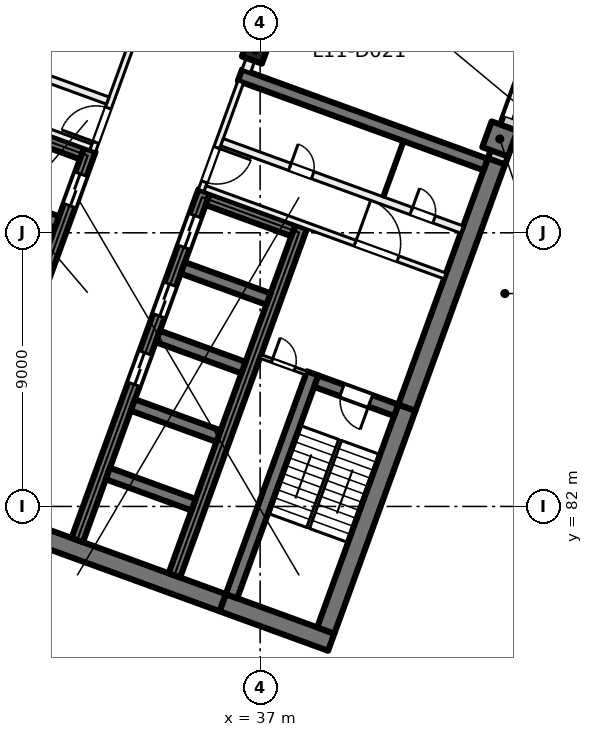
"""IFC4 building model, lengths in metres.
Left out: names, types, materials, properties, quantities, classifications, styles, units other than length and angle.
Written with IfcOpenShell. Run it as: python <this file> out.ifc"""

import sys

from ifc_helpers import new_model, si_unit, direction, frame, frame_2d, origin, origin_2d, place, context, subcontext, project, spatial, rectangle, extrude, element, fill, save


model = new_model("IFC4")
c1 = context("Model", 3, precision=1e-05, world=origin(), true_north=direction((0.0, 1.0)))
c2 = subcontext(c1, "Body", "Model", "MODEL_VIEW")
j1 = project(units=[si_unit("LENGTHUNIT", "METRE"), si_unit("PLANEANGLEUNIT", "RADIAN")], contexts=[c1])
p1 = place(None, origin())
s1 = spatial("IfcSite", under=j1, at=p1, CompositionType="ELEMENT")
p2 = place(p1, origin())
s2 = spatial("IfcBuilding", under=s1, at=p2, CompositionType="ELEMENT")
p3 = place(p2, frame((0.0, 0.0, 51.5)))
s3 = spatial("IfcBuildingStorey", under=s2, at=p3, CompositionType="ELEMENT", Elevation=51.5)
p4 = place(p3, frame((36.849, 97.011, 0.0), z_axis=(0.0, 0.0, 1.0), x_axis=(-0.342020143326, -0.939692620786, 0.0)))
e1 = element("IfcColumn", 1, at=p4, inside=s3, PredefinedType="COLUMN", context=c2, shape_type="SweptSolid", body=[
    extrude(rectangle(XDim=0.7, YDim=0.7, at=origin_2d()), origin(), (0.0, 0.0, 1.0), 4.0),
])
p5 = place(p3, frame((44.884, 94.087, 0.0), z_axis=(0.0, 0.0, 1.0), x_axis=(-0.342020143326, -0.939692620786, 0.0)))
e2 = element("IfcColumn", 2, at=p5, inside=s3, PredefinedType="COLUMN", context=c2, shape_type="SweptSolid", body=[
    extrude(rectangle(XDim=0.9, YDim=0.9, at=origin_2d()), origin(), (0.0, 0.0, 1.0), 4.0),
])
p6 = place(p3, frame((39.338, 77.535, 0.0), z_axis=(0.0, 0.0, 1.0), x_axis=(-0.939701471648, 0.341995824804, 0.0)))
e3 = element("IfcWall", 3, at=p6, inside=s3, PredefinedType="SHEAR", context=c2, shape_type="SweptSolid", body=[
    extrude(rectangle(XDim=3.8, YDim=0.6, at=frame_2d((1.9, 0.0))), origin(), (0.0, 0.0, 1.0), 4.0),
])
p7 = place(p3, frame((35.767, 78.835, 0.0), z_axis=(0.0, 0.0, 1.0), x_axis=(-0.939692894512, 0.342019391267, 0.0)))
e4 = element("IfcWall", 4, at=p7, inside=s3, PredefinedType="SHEAR", context=c2, shape_type="SweptSolid", body=[
    extrude(rectangle(XDim=14.4, YDim=0.6, at=frame_2d((7.2, 0.0))), origin(), (0.0, 0.0, 1.0), 4.0),
])
p8 = place(p3, frame((39.159, 77.92, 0.0), z_axis=(0.0, 0.0, 1.0), x_axis=(0.342016982193, 0.939693771338, 0.0)))
e5 = element("IfcWall", 5, at=p8, inside=s3, PredefinedType="SHEAR", context=c2, shape_type="SweptSolid", body=[
    extrude(rectangle(XDim=7.8, YDim=0.6, at=frame_2d((3.9, 0.0))), origin(), (0.0, 0.0, 1.0), 4.0),
])
p9 = place(p3, frame((41.827, 85.249, 0.0), z_axis=(0.0, 0.0, 1.0), x_axis=(0.342016162452, 0.939694069696, 0.0)))
e6 = element("IfcWall", 6, at=p9, inside=s3, PredefinedType="SHEAR", context=c2, shape_type="SweptSolid", body=[
    extrude(rectangle(XDim=8.9, YDim=0.6, at=frame_2d((4.45, 0.0))), origin(), (0.0, 0.0, 1.0), 4.0),
])
p10 = place(p3, frame((36.058, 79.048, 0.0), z_axis=(0.0, 0.0, 1.0), x_axis=(0.342016982193, 0.939693771338, 0.0)))
e7 = element("IfcWall", 7, at=p10, inside=s3, PredefinedType="SHEAR", context=c2, shape_type="SweptSolid", body=[
    extrude(rectangle(XDim=7.8, YDim=0.4, at=frame_2d((3.9, 0.0))), origin(), (0.0, 0.0, 1.0), 4.0),
])
p11 = place(p3, frame((41.476, 85.164, 0.0), z_axis=(0.0, 0.0, 1.0), x_axis=(-0.939678810556, 0.342058084236, 0.0)))
e8 = element("IfcWall", 8, at=p11, inside=s3, PredefinedType="SHEAR", context=c2, shape_type="SweptSolid", body=[
    extrude(rectangle(XDim=2.8, YDim=0.4, at=frame_2d((1.4, 0.0))), origin(), (0.0, 0.0, 1.0), 4.0),
])
p12 = place(p11, frame((0.9, 0.0, 0.0)))
e9 = element("IfcOpeningElement", 9, at=p12, cuts=e8, PredefinedType="OPENING", context=c2, shape_type="SweptSolid", body=[
    extrude(rectangle(XDim=1.0, YDim=2.1, at=frame_2d((0.5, 1.05))), frame((0.0, 0.21, 0.0), z_axis=(0.0, -1.0, 0.0), x_axis=(1.0, 0.0, 0.0)), (0.0, 0.0, 1.0), 0.42),
])
p13 = place(p3, frame((30.984, 80.895, 0.0), z_axis=(0.0, 0.0, 1.0), x_axis=(0.342021021735, 0.939692301071, 0.0)))
e10 = element("IfcWall", 10, at=p13, inside=s3, PredefinedType="SHEAR", context=c2, shape_type="SweptSolid", body=[
    extrude(rectangle(XDim=12.2, YDim=0.4, at=frame_2d((6.1, 0.0))), origin(), (0.0, 0.0, 1.0), 4.0),
])
p14 = place(p13, frame((5.45, 0.0, 0.0)))
e11 = element("IfcOpeningElement", 11, at=p14, cuts=e10, PredefinedType="OPENING", context=c2, shape_type="SweptSolid", body=[
    extrude(rectangle(XDim=1.1, YDim=2.1, at=frame_2d((0.55, 1.05))), frame((0.0, 0.21, 0.0), z_axis=(0.0, -1.0, 0.0), x_axis=(1.0, 0.0, 0.0)), (0.0, 0.0, 1.0), 0.42),
])
p15 = place(p13, frame((7.85, 0.0, 0.0)))
e12 = element("IfcOpeningElement", 12, at=p15, cuts=e10, PredefinedType="OPENING", context=c2, shape_type="SweptSolid", body=[
    extrude(rectangle(XDim=1.1, YDim=2.1, at=frame_2d((0.55, 1.05))), frame((0.0, 0.21, 0.0), z_axis=(0.0, -1.0, 0.0), x_axis=(1.0, 0.0, 0.0)), (0.0, 0.0, 1.0), 0.42),
])
p16 = place(p13, frame((10.25, 0.0, 0.0)))
e13 = element("IfcOpeningElement", 13, at=p16, cuts=e10, PredefinedType="OPENING", context=c2, shape_type="SweptSolid", body=[
    extrude(rectangle(XDim=1.1, YDim=2.1, at=frame_2d((0.55, 1.05))), frame((0.0, 0.21, 0.0), z_axis=(0.0, -1.0, 0.0), x_axis=(1.0, 0.0, 0.0)), (0.0, 0.0, 1.0), 0.42),
])
p17 = place(p3, frame((34.178, 79.732, 0.0), z_axis=(0.0, 0.0, 1.0), x_axis=(0.342014590177, 0.939694641948, 0.0)))
e14 = element("IfcWall", 14, at=p17, inside=s3, PredefinedType="SHEAR", context=c2, shape_type="SweptSolid", body=[
    extrude(rectangle(XDim=12.2, YDim=0.4, at=frame_2d((6.1, 0.0))), origin(), (0.0, 0.0, 1.0), 4.0),
])
for number, where, z_axis, x_axis in (
    (15, (34.812, 82.056, 0.0), (0.0, 0.0, 1.0), (-0.94, 0.342, 0.0)),
    (16, (35.632, 84.311, 0.0), (0.0, 0.0, 1.0), (-0.94, 0.342, 0.0)),
    (17, (36.453, 86.566, 0.0), (0.0, 0.0, 1.0), (-0.94, 0.342, 0.0)),
    (18, (37.274, 88.822, 0.0), (0.0, 0.0, 1.0), (-0.94, 0.342, 0.0)),
):
    element("IfcWall", number, at=place(p3, frame(where, z_axis=z_axis, x_axis=x_axis)), inside=s3, PredefinedType="SHEAR", context=c2, shape_type="SweptSolid", body=[
        extrude(rectangle(XDim=3.0, YDim=0.4, at=frame_2d((1.5, 0.0))), origin(), (0.0, 0.0, 1.0), 4.0),
    ])
p18 = place(p3, frame((38.095, 91.077, 0.0), z_axis=(0.0, 0.0, 1.0), x_axis=(-0.939676934218, 0.342063238742, 0.0)))
e19 = element("IfcWall", 19, at=p18, inside=s3, PredefinedType="SHEAR", context=c2, shape_type="SweptSolid", body=[
    extrude(rectangle(XDim=3.0, YDim=0.4, at=frame_2d((1.5, 0.0))), origin(), (0.0, 0.0, 1.0), 4.0),
])
p19 = place(p3, frame((27.225, 82.263, 0.0), z_axis=(0.0, 0.0, 1.0), x_axis=(0.342014590177, 0.939694641948, 0.0)))
e20 = element("IfcWall", 20, at=p19, inside=s3, PredefinedType="SHEAR", context=c2, shape_type="SweptSolid", body=[
    extrude(rectangle(XDim=12.2, YDim=0.4, at=frame_2d((6.1, 0.0))), origin(), (0.0, 0.0, 1.0), 4.0),
])
p20 = place(p19, frame((10.25, 0.0, 0.0)))
e21 = element("IfcOpeningElement", 21, at=p20, cuts=e20, PredefinedType="OPENING", context=c2, shape_type="SweptSolid", body=[
    extrude(rectangle(XDim=1.1, YDim=2.1, at=frame_2d((0.55, 1.05))), frame((0.0, 0.21, 0.0), z_axis=(0.0, -1.0, 0.0), x_axis=(1.0, 0.0, 0.0)), (0.0, 0.0, 1.0), 0.42),
])
p21 = place(p19, frame((0.6, 0.0, 0.0)))
e22 = element("IfcOpeningElement", 22, at=p21, cuts=e20, PredefinedType="OPENING", context=c2, shape_type="SweptSolid", body=[
    extrude(rectangle(XDim=1.0, YDim=2.1, at=frame_2d((0.5, 1.05))), frame((0.0, 0.21, 0.0), z_axis=(0.0, -1.0, 0.0), x_axis=(1.0, 0.0, 0.0)), (0.0, 0.0, 1.0), 0.42),
])
for number, where, z_axis, x_axis in (
    (23, (30.32, 91.353, 0.0), (0.0, 0.0, 1.0), (-0.94, 0.342, 0.0)),
    (24, (31.141, 93.608, 0.0), (0.0, 0.0, 1.0), (-0.94, 0.342, 0.0)),
):
    element("IfcWall", number, at=place(p3, frame(where, z_axis=z_axis, x_axis=x_axis)), inside=s3, PredefinedType="SHEAR", context=c2, shape_type="SweptSolid", body=[
        extrude(rectangle(XDim=3.0, YDim=0.4, at=frame_2d((1.5, 0.0))), origin(), (0.0, 0.0, 1.0), 4.0),
    ])
p22 = place(p3, frame((44.418, 93.245, 0.0), z_axis=(0.0, 0.0, 1.0), x_axis=(-0.93969060187, 0.342025690201, 0.0)))
e25 = element("IfcWall", 25, at=p22, inside=s3, PredefinedType="SHEAR", context=c2, shape_type="SweptSolid", body=[
    extrude(rectangle(XDim=8.6, YDim=0.4, at=frame_2d((4.3, 0.0))), origin(), (0.0, 0.0, 1.0), 4.0),
])
p23 = place(p3, frame((52.212, 113.783, 0.0), z_axis=(0.0, 0.0, 1.0), x_axis=(-0.34202521188, -0.939690775968, 0.0)))
e26 = element("IfcWall", 26, at=p23, inside=s3, PredefinedType="SOLIDWALL", context=c2, shape_type="SweptSolid", body=[
    extrude(rectangle(XDim=21.745, YDim=0.6, at=frame_2d((10.873, 0.0))), origin(), (0.0, 0.0, 1.0), 3.625),
])
p24 = place(p23, frame((3.765, 0.0, 0.9)))
e27 = element("IfcOpeningElement", 27, at=p24, cuts=e26, PredefinedType="OPENING", context=c2, shape_type="SweptSolid", body=[
    extrude(rectangle(XDim=3.0, YDim=2.4, at=frame_2d((1.5, 1.2))), frame((0.0, 0.31, 0.0), z_axis=(0.0, -1.0, 0.0), x_axis=(1.0, 0.0, 0.0)), (0.0, 0.0, 1.0), 0.62),
])
p25 = place(p23, frame((8.265, 0.0, 0.9)))
e28 = element("IfcOpeningElement", 28, at=p25, cuts=e26, PredefinedType="OPENING", context=c2, shape_type="SweptSolid", body=[
    extrude(rectangle(XDim=3.0, YDim=2.4, at=frame_2d((1.5, 1.2))), frame((0.0, 0.31, 0.0), z_axis=(0.0, -1.0, 0.0), x_axis=(1.0, 0.0, 0.0)), (0.0, 0.0, 1.0), 0.62),
])
p26 = place(p23, frame((12.765, 0.0, 0.9)))
e29 = element("IfcOpeningElement", 29, at=p26, cuts=e26, PredefinedType="OPENING", context=c2, shape_type="SweptSolid", body=[
    extrude(rectangle(XDim=3.0, YDim=2.4, at=frame_2d((1.5, 1.2))), frame((0.0, 0.31, 0.0), z_axis=(0.0, -1.0, 0.0), x_axis=(1.0, 0.0, 0.0)), (0.0, 0.0, 1.0), 0.62),
])
p27 = place(p23, frame((17.265, 0.0, 0.9)))
e30 = element("IfcOpeningElement", 30, at=p27, cuts=e26, PredefinedType="OPENING", context=c2, shape_type="SweptSolid", body=[
    extrude(rectangle(XDim=3.0, YDim=2.4, at=frame_2d((1.5, 1.2))), frame((0.0, 0.31, 0.0), z_axis=(0.0, -1.0, 0.0), x_axis=(1.0, 0.0, 0.0)), (0.0, 0.0, 1.0), 0.62),
])
p28 = place(p3, frame((31.491, 93.693, 0.0), z_axis=(0.0, 0.0, 1.0), x_axis=(0.341995824804, 0.939701471648, 0.0)))
e31 = element("IfcWall", 31, at=p28, inside=s3, PredefinedType="PARTITIONING", context=c2, shape_type="SweptSolid", body=[
    extrude(rectangle(XDim=3.8, YDim=0.2, at=frame_2d((1.9, 0.0))), origin(), (0.0, 0.0, 1.0), 3.625),
])
p29 = place(p28, frame((0.3, 0.0, 0.0)))
e32 = element("IfcOpeningElement", 32, at=p29, cuts=e31, PredefinedType="OPENING", context=c2, shape_type="SweptSolid", body=[
    extrude(rectangle(XDim=1.2, YDim=2.1, at=frame_2d((0.6, 1.05))), frame((0.0, 0.11, 0.0), z_axis=(0.0, -1.0, 0.0), x_axis=(1.0, 0.0, 0.0)), (0.0, 0.0, 1.0), 0.22),
])
p30 = place(p3, frame((23.538, 96.694, 0.0), z_axis=(0.0, 0.0, 1.0), x_axis=(0.939691552312, -0.342023078919, 0.0)))
e33 = element("IfcWall", 33, at=p30, inside=s3, PredefinedType="PARTITIONING", context=c2, shape_type="SweptSolid", body=[
    extrude(rectangle(XDim=8.4, YDim=0.2, at=frame_2d((4.2, 0.0))), origin(), (0.0, 0.0, 1.0), 3.625),
])
p31 = place(p30, frame((1.65, 0.0, 0.0)))
e34 = element("IfcOpeningElement", 34, at=p31, cuts=e33, PredefinedType="OPENING", context=c2, shape_type="SweptSolid", body=[
    extrude(rectangle(XDim=1.5, YDim=2.1, at=frame_2d((0.75, 1.05))), frame((0.0, 0.11, 0.0), z_axis=(0.0, -1.0, 0.0), x_axis=(1.0, 0.0, 0.0)), (0.0, 0.0, 1.0), 0.22),
])
p32 = place(p3, frame((24.094, 98.221, 0.0), z_axis=(0.0, 0.0, 1.0), x_axis=(0.939691552312, -0.342023078919, 0.0)))
e35 = element("IfcWall", 35, at=p32, inside=s3, PredefinedType="PARTITIONING", context=c2, shape_type="SweptSolid", body=[
    extrude(rectangle(XDim=8.4, YDim=0.25, at=frame_2d((4.2, 0.0))), origin(), (0.0, 0.0, 1.0), 3.625),
])
p33 = place(p32, frame((5.225, 0.0, 0.0)))
e36 = element("IfcOpeningElement", 36, at=p33, cuts=e35, PredefinedType="OPENING", context=c2, shape_type="SweptSolid", body=[
    extrude(rectangle(XDim=0.8, YDim=2.1, at=frame_2d((0.4, 1.05))), frame((0.0, 0.135, 0.0), z_axis=(0.0, -1.0, 0.0), x_axis=(1.0, 0.0, 0.0)), (0.0, 0.0, 1.0), 0.27),
])
p34 = place(p32, frame((0.975, 0.0, 0.0)))
e37 = element("IfcOpeningElement", 37, at=p34, cuts=e35, PredefinedType="OPENING", context=c2, shape_type="SweptSolid", body=[
    extrude(rectangle(XDim=0.8, YDim=2.1, at=frame_2d((0.4, 1.05))), frame((0.0, 0.135, 0.0), z_axis=(0.0, -1.0, 0.0), x_axis=(1.0, 0.0, 0.0)), (0.0, 0.0, 1.0), 0.27),
])
p35 = place(p3, frame((36.362, 95.964, 0.0), z_axis=(0.0, 0.0, 1.0), x_axis=(-0.341995824804, -0.939701471648, 0.0)))
e38 = element("IfcWall", 38, at=p35, inside=s3, PredefinedType="PARTITIONING", context=c2, shape_type="SweptSolid", body=[
    extrude(rectangle(XDim=3.8, YDim=0.2, at=frame_2d((1.9, 0.0))), origin(), (0.0, 0.0, 1.0), 3.625),
])
p36 = place(p35, frame((2.3, 0.0, 0.0)))
e39 = element("IfcOpeningElement", 39, at=p36, cuts=e38, PredefinedType="OPENING", context=c2, shape_type="SweptSolid", body=[
    extrude(rectangle(XDim=1.2, YDim=2.1, at=frame_2d((0.6, 1.05))), frame((0.0, 0.11, 0.0), z_axis=(0.0, -1.0, 0.0), x_axis=(1.0, 0.0, 0.0)), (0.0, 0.0, 1.0), 0.22),
])
p37 = place(p3, frame((35.19, 92.453, 0.0), z_axis=(0.0, 0.0, 1.0), x_axis=(0.939691552312, -0.342023078919, 0.0)))
e40 = element("IfcWall", 40, at=p37, inside=s3, PredefinedType="PARTITIONING", context=c2, shape_type="SweptSolid", body=[
    extrude(rectangle(XDim=8.4, YDim=0.2, at=frame_2d((4.2, 0.0))), origin(), (0.0, 0.0, 1.0), 3.625),
])
p38 = place(p37, frame((5.25, 0.0, 0.0)))
e41 = element("IfcOpeningElement", 41, at=p38, cuts=e40, PredefinedType="OPENING", context=c2, shape_type="SweptSolid", body=[
    extrude(rectangle(XDim=1.5, YDim=2.1, at=frame_2d((0.75, 1.05))), frame((0.0, 0.11, 0.0), z_axis=(0.0, -1.0, 0.0), x_axis=(1.0, 0.0, 0.0)), (0.0, 0.0, 1.0), 0.22),
])
p39 = place(p3, frame((35.746, 93.98, 0.0), z_axis=(0.0, 0.0, 1.0), x_axis=(0.939691552312, -0.342023078919, 0.0)))
e42 = element("IfcWall", 42, at=p39, inside=s3, PredefinedType="PARTITIONING", context=c2, shape_type="SweptSolid", body=[
    extrude(rectangle(XDim=8.4, YDim=0.25, at=frame_2d((4.2, 0.0))), origin(), (0.0, 0.0, 1.0), 3.625),
])
p40 = place(p39, frame((2.375, 0.0, 0.0)))
e43 = element("IfcOpeningElement", 43, at=p40, cuts=e42, PredefinedType="OPENING", context=c2, shape_type="SweptSolid", body=[
    extrude(rectangle(XDim=0.8, YDim=2.1, at=frame_2d((0.4, 1.05))), frame((0.0, 0.135, 0.0), z_axis=(0.0, -1.0, 0.0), x_axis=(1.0, 0.0, 0.0)), (0.0, 0.0, 1.0), 0.27),
])
p41 = place(p39, frame((6.625, 0.0, 0.0)))
e44 = element("IfcOpeningElement", 44, at=p41, cuts=e42, PredefinedType="OPENING", context=c2, shape_type="SweptSolid", body=[
    extrude(rectangle(XDim=0.8, YDim=2.1, at=frame_2d((0.4, 1.05))), frame((0.0, 0.135, 0.0), z_axis=(0.0, -1.0, 0.0), x_axis=(1.0, 0.0, 0.0)), (0.0, 0.0, 1.0), 0.27),
])
p42 = place(p3, frame((37.013, 86.935, 0.0), z_axis=(0.0, 0.0, 1.0), x_axis=(0.939659694648, -0.342110593602, 0.0)))
e45 = element("IfcWall", 45, at=p42, inside=s3, PredefinedType="PARTITIONING", context=c2, shape_type="SweptSolid", body=[
    extrude(rectangle(XDim=1.6, YDim=0.125, at=frame_2d((0.8, 0.0))), origin(), (0.0, 0.0, 1.0), 3.625),
])
p43 = place(p42, frame((0.4, 0.0, 0.0)))
e46 = element("IfcOpeningElement", 46, at=p43, cuts=e45, PredefinedType="OPENING", context=c2, shape_type="SweptSolid", body=[
    extrude(rectangle(XDim=0.8, YDim=2.1, at=frame_2d((0.4, 1.05))), frame((0.0, 0.073, 0.0), z_axis=(0.0, -1.0, 0.0), x_axis=(1.0, 0.0, 0.0)), (0.0, 0.0, 1.0), 0.145),
])
p44 = place(p3, frame((41.718, 94.015, 0.0), z_axis=(0.0, 0.0, 1.0), x_axis=(-0.342064742067, -0.939676386973, 0.0)))
e47 = element("IfcWall", 47, at=p44, inside=s3, PredefinedType="PARTITIONING", context=c2, shape_type="SweptSolid", body=[
    extrude(rectangle(XDim=1.95, YDim=0.1, at=frame_2d((0.975, 0.0))), origin(), (0.0, 0.0, 1.0), 3.625),
])
p45 = place(p3, frame((44.612, 118.483, 0.0), z_axis=(0.0, 0.0, 1.0), x_axis=(-0.342043123066, -0.939684256526, 0.0)))
e48 = element("IfcWall", 48, at=p45, inside=s3, PredefinedType="PARTITIONING", context=c2, shape_type="SweptSolid", body=[
    extrude(rectangle(XDim=23.582, YDim=0.3, at=frame_2d((11.791, 0.0))), origin(), (0.0, 0.0, 1.0), 3.625),
])
p46 = place(p45, frame((14.932, 0.0, 0.0)))
e49 = element("IfcOpeningElement", 49, at=p46, cuts=e48, PredefinedType="OPENING", context=c2, shape_type="SweptSolid", body=[
    extrude(rectangle(XDim=0.8, YDim=2.1, at=frame_2d((0.4, 1.05))), frame((0.0, 0.16, 0.0), z_axis=(0.0, -1.0, 0.0), x_axis=(1.0, 0.0, 0.0)), (0.0, 0.0, 1.0), 0.32),
])
p47 = place(p45, frame((10.982, 0.0, 0.0)))
e50 = element("IfcOpeningElement", 50, at=p47, cuts=e48, PredefinedType="OPENING", context=c2, shape_type="SweptSolid", body=[
    extrude(rectangle(XDim=1.2, YDim=2.1, at=frame_2d((0.6, 1.05))), frame((0.0, 0.16, 0.0), z_axis=(0.0, -1.0, 0.0), x_axis=(1.0, 0.0, 0.0)), (0.0, 0.0, 1.0), 0.32),
])
p48 = place(p45, frame((19.307, 0.0, 0.0)))
e51 = element("IfcOpeningElement", 51, at=p48, cuts=e48, PredefinedType="OPENING", context=c2, shape_type="SweptSolid", body=[
    extrude(rectangle(XDim=1.8, YDim=2.1, at=frame_2d((0.9, 1.05))), frame((0.0, 0.16, 0.0), z_axis=(0.0, -1.0, 0.0), x_axis=(1.0, 0.0, 0.0)), (0.0, 0.0, 1.0), 0.32),
])
p49 = place(p45, frame((5.756, 0.0, 0.0)))
e52 = element("IfcOpeningElement", 52, at=p49, cuts=e48, PredefinedType="OPENING", context=c2, shape_type="SweptSolid", body=[
    extrude(rectangle(XDim=1.8, YDim=2.1, at=frame_2d((0.9, 1.05))), frame((0.0, 0.16, 0.0), z_axis=(0.0, -1.0, 0.0), x_axis=(1.0, 0.0, 0.0)), (0.0, 0.0, 1.0), 0.32),
])
p50 = place(p27, origin())
e53 = element("IfcWindow", 53, at=p50, inside=s3, PartitioningType="SINGLE_PANEL", PredefinedType="WINDOW", context=c2, shape_type="SweptSolid", body=[
    extrude(rectangle(XDim=3.0, YDim=2.4, at=frame_2d((1.5, 1.2))), frame((0.0, 0.03, 0.0), z_axis=(0.0, -1.0, 0.0), x_axis=(1.0, 0.0, 0.0)), (0.0, 0.0, 1.0), 0.06),
])
fill(e30, e53)
p51 = place(p20, origin())
e54 = element("IfcDoor", 54, at=p51, inside=s3, OperationType="DOUBLE_DOOR_SLIDING", PredefinedType="DOOR", context=c2, shape_type="SweptSolid", body=[
    extrude(rectangle(XDim=1.1, YDim=2.1, at=frame_2d((0.55, 1.05))), frame((0.0, 0.025, 0.0), z_axis=(0.0, -1.0, 0.0), x_axis=(1.0, 0.0, 0.0)), (0.0, 0.0, 1.0), 0.05),
])
fill(e21, e54)
p52 = place(p14, origin())
e55 = element("IfcDoor", 55, at=p52, inside=s3, OperationType="DOUBLE_DOOR_SLIDING", PredefinedType="DOOR", context=c2, shape_type="SweptSolid", body=[
    extrude(rectangle(XDim=1.1, YDim=2.1, at=frame_2d((0.55, 1.05))), frame((0.0, 0.025, 0.0), z_axis=(0.0, -1.0, 0.0), x_axis=(1.0, 0.0, 0.0)), (0.0, 0.0, 1.0), 0.05),
])
fill(e11, e55)
p53 = place(p15, origin())
e56 = element("IfcDoor", 56, at=p53, inside=s3, OperationType="DOUBLE_DOOR_SLIDING", PredefinedType="DOOR", context=c2, shape_type="SweptSolid", body=[
    extrude(rectangle(XDim=1.1, YDim=2.1, at=frame_2d((0.55, 1.05))), frame((0.0, 0.025, 0.0), z_axis=(0.0, -1.0, 0.0), x_axis=(1.0, 0.0, 0.0)), (0.0, 0.0, 1.0), 0.05),
])
fill(e12, e56)
p54 = place(p16, origin())
e57 = element("IfcDoor", 57, at=p54, inside=s3, OperationType="DOUBLE_DOOR_SLIDING", PredefinedType="DOOR", context=c2, shape_type="SweptSolid", body=[
    extrude(rectangle(XDim=1.1, YDim=2.1, at=frame_2d((0.55, 1.05))), frame((0.0, 0.025, 0.0), z_axis=(0.0, -1.0, 0.0), x_axis=(1.0, 0.0, 0.0)), (0.0, 0.0, 1.0), 0.05),
])
fill(e13, e57)
p55 = place(p29, origin())
e58 = element("IfcDoor", 58, at=p55, inside=s3, OperationType="DOUBLE_DOOR_SINGLE_SWING", PredefinedType="DOOR", context=c2, shape_type="SweptSolid", body=[
    extrude(rectangle(XDim=1.2, YDim=2.1, at=frame_2d((0.6, 1.05))), frame((0.0, 0.025, 0.0), z_axis=(0.0, -1.0, 0.0), x_axis=(1.0, 0.0, 0.0)), (0.0, 0.0, 1.0), 0.05),
])
fill(e32, e58)
p56 = place(p36, origin())
e59 = element("IfcDoor", 59, at=p56, inside=s3, OperationType="DOUBLE_DOOR_SINGLE_SWING", PredefinedType="DOOR", context=c2, shape_type="SweptSolid", body=[
    extrude(rectangle(XDim=1.2, YDim=2.1, at=frame_2d((0.6, 1.05))), frame((0.0, 0.025, 0.0), z_axis=(0.0, -1.0, 0.0), x_axis=(1.0, 0.0, 0.0)), (0.0, 0.0, 1.0), 0.05),
])
fill(e39, e59)
p57 = place(p38, origin())
e60 = element("IfcDoor", 60, at=p57, inside=s3, OperationType="DOUBLE_DOOR_SINGLE_SWING", PredefinedType="DOOR", context=c2, shape_type="SweptSolid", body=[
    extrude(rectangle(XDim=1.5, YDim=2.1, at=frame_2d((0.75, 1.05))), frame((0.0, 0.025, 0.0), z_axis=(0.0, -1.0, 0.0), x_axis=(1.0, 0.0, 0.0)), (0.0, 0.0, 1.0), 0.05),
])
fill(e41, e60)
p58 = place(p12, origin())
e61 = element("IfcDoor", 61, at=p58, inside=s3, OperationType="SINGLE_SWING_RIGHT", PredefinedType="DOOR", context=c2, shape_type="SweptSolid", body=[
    extrude(rectangle(XDim=1.0, YDim=2.1, at=frame_2d((0.5, 1.05))), frame((0.0, 0.025, 0.0), z_axis=(0.0, -1.0, 0.0), x_axis=(1.0, 0.0, 0.0)), (0.0, 0.0, 1.0), 0.05),
])
fill(e9, e61)
p59 = place(p43, origin())
e62 = element("IfcDoor", 62, at=p59, inside=s3, OperationType="SINGLE_SWING_LEFT", PredefinedType="DOOR", context=c2, shape_type="SweptSolid", body=[
    extrude(rectangle(XDim=0.8, YDim=2.1, at=frame_2d((0.4, 1.05))), frame((0.0, 0.025, 0.0), z_axis=(0.0, -1.0, 0.0), x_axis=(1.0, 0.0, 0.0)), (0.0, 0.0, 1.0), 0.05),
])
fill(e46, e62)
p60 = place(p40, origin())
e63 = element("IfcDoor", 63, at=p60, inside=s3, OperationType="SINGLE_SWING_RIGHT", PredefinedType="DOOR", context=c2, shape_type="SweptSolid", body=[
    extrude(rectangle(XDim=0.8, YDim=2.1, at=frame_2d((0.4, 1.05))), frame((0.0, 0.025, 0.0), z_axis=(0.0, -1.0, 0.0), x_axis=(1.0, 0.0, 0.0)), (0.0, 0.0, 1.0), 0.05),
])
fill(e43, e63)
p61 = place(p41, origin())
e64 = element("IfcDoor", 64, at=p61, inside=s3, OperationType="SINGLE_SWING_LEFT", PredefinedType="DOOR", context=c2, shape_type="SweptSolid", body=[
    extrude(rectangle(XDim=0.8, YDim=2.1, at=frame_2d((0.4, 1.05))), frame((0.0, 0.025, 0.0), z_axis=(0.0, -1.0, 0.0), x_axis=(1.0, 0.0, 0.0)), (0.0, 0.0, 1.0), 0.05),
])
fill(e44, e64)
save(model, sys.argv[1])
